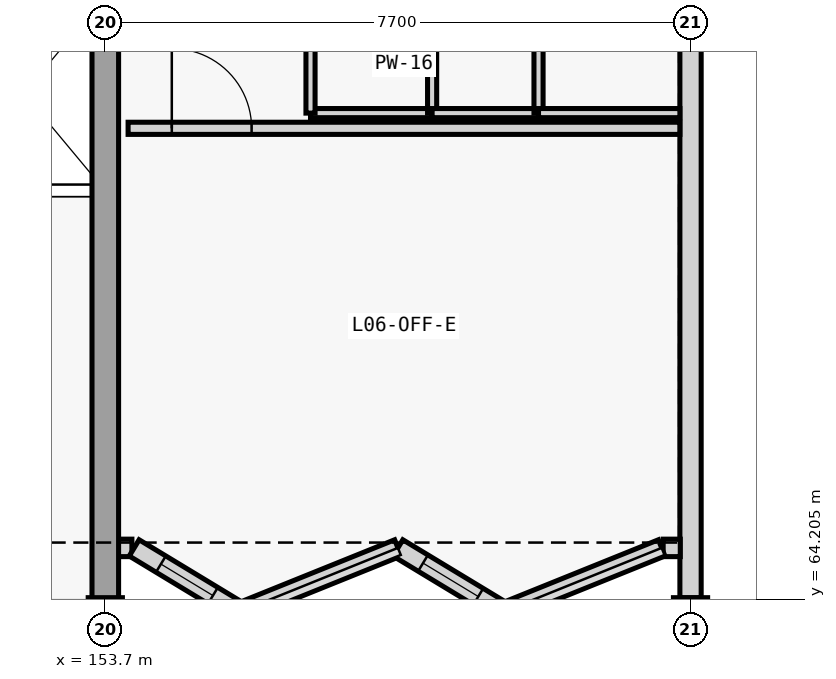
"""IFC4 building model, lengths in metres.
Left out: names, types, materials, properties, quantities, classifications, styles, units other than length and angle.
Written with IfcOpenShell. Run it as: python <this file> out.ifc"""

import sys

from ifc_helpers import new_model, si_unit, direction, frame, frame_2d, origin, origin_2d, place, context, subcontext, project, spatial, rectangle, extrude, element, fill, save


model = new_model("IFC4")
c1 = context("Model", 3, precision=1e-05, world=origin(), true_north=direction((0.0, 1.0)))
c2 = subcontext(c1, "Body", "Model", "MODEL_VIEW")
j1 = project(units=[si_unit("LENGTHUNIT", "METRE"), si_unit("PLANEANGLEUNIT", "RADIAN")], contexts=[c1])
p1 = place(None, origin())
s1 = spatial("IfcSite", under=j1, at=p1, CompositionType="ELEMENT")
p2 = place(p1, origin())
s2 = spatial("IfcBuilding", under=s1, at=p2, CompositionType="ELEMENT")
p3 = place(p2, frame((0.0, 0.0, 25.2)))
s3 = spatial("IfcBuildingStorey", under=s2, at=p3, CompositionType="ELEMENT", Elevation=25.2)
for number, where, z_axis, x_axis in (
    (1, (153.7, 64.0, 0.0), (0.0, 0.0, 1.0), (1.0, 0.0, 0.0)),
    (2, (161.4, 64.0, 0.0), (0.0, 0.0, 1.0), (1.0, 0.0, 0.0)),
):
    element("IfcColumn", number, at=place(p3, frame(where, z_axis=z_axis, x_axis=x_axis)), inside=s3, PredefinedType="COLUMN", context=c2, shape_type="SweptSolid", body=[
        extrude(rectangle(XDim=0.45, YDim=0.45, at=origin_2d()), origin(), (0.0, 0.0, 1.0), 3.6),
    ])
p4 = place(p3, frame((161.4, 96.777, 0.0), z_axis=(0.0, 0.0, 1.0), x_axis=(0.0, -1.0, 0.0)))
e3 = element("IfcWall", 3, at=p4, inside=s3, PredefinedType="SOLIDWALL", context=c2, shape_type="SweptSolid", body=[
    extrude(rectangle(XDim=32.554, YDim=0.28, at=frame_2d((16.277, 0.0))), origin(), (0.0, 0.0, 1.0), 2.78),
])
p5 = place(p4, frame((17.477, 0.0, 0.82)))
e4 = element("IfcOpeningElement", 4, at=p5, cuts=e3, PredefinedType="OPENING", context=c2, shape_type="SweptSolid", body=[
    extrude(rectangle(XDim=5.0, YDim=1.5, at=frame_2d((2.5, 0.75))), frame((0.0, 0.15, 0.0), z_axis=(0.0, -1.0, 0.0), x_axis=(1.0, 0.0, 0.0)), (0.0, 0.0, 1.0), 0.3),
])
p6 = place(p3, frame((154.05, 64.88, 0.0), z_axis=(0.0, 0.0, 1.0), x_axis=(-1.0, 0.0, 0.0)))
e5 = element("IfcWall", 5, at=p6, inside=s3, PredefinedType="SOLIDWALL", context=c2, shape_type="SweptSolid", body=[
    extrude(rectangle(XDim=0.18, YDim=0.23, at=frame_2d((0.09, 0.0))), origin(), (0.0, 0.0, 1.0), 3.36),
])
p7 = place(p3, frame((161.265, 64.88, 0.0), z_axis=(0.0, 0.0, 1.0), x_axis=(-1.0, 0.0, 0.0)))
e6 = element("IfcWall", 6, at=p7, inside=s3, PredefinedType="SOLIDWALL", context=c2, shape_type="SweptSolid", body=[
    extrude(rectangle(XDim=0.225, YDim=0.23, at=frame_2d((0.112, 0.0))), origin(), (0.0, 0.0, 1.0), 3.36),
])
p8 = place(p3, frame((155.468, 64.04, 0.0), z_axis=(0.0, 0.0, 1.0), x_axis=(-0.855561475997, 0.51770122734, 0.0)))
e7 = element("IfcWall", 7, at=p8, inside=s3, PredefinedType="SOLIDWALL", context=c2, shape_type="SweptSolid", body=[
    extrude(rectangle(XDim=1.622, YDim=0.25, at=frame_2d((0.811, 0.0))), origin(), (0.0, 0.0, 1.0), 3.36),
])
p9 = place(p8, frame((0.411, 0.0, 0.82)))
e8 = element("IfcOpeningElement", 8, at=p9, cuts=e7, PredefinedType="OPENING", context=c2, shape_type="SweptSolid", body=[
    extrude(rectangle(XDim=0.8, YDim=1.35, at=frame_2d((0.4, 0.675))), frame((0.0, 0.135, 0.0), z_axis=(0.0, -1.0, 0.0), x_axis=(1.0, 0.0, 0.0)), (0.0, 0.0, 1.0), 0.27),
])
p10 = place(p3, frame((157.55, 64.88, 0.0), z_axis=(0.0, 0.0, 1.0), x_axis=(-0.927392797001, -0.374089026933, 0.0)))
e9 = element("IfcWall", 9, at=p10, inside=s3, PredefinedType="SOLIDWALL", context=c2, shape_type="SweptSolid", body=[
    extrude(rectangle(XDim=2.245, YDim=0.23, at=frame_2d((1.123, 0.0))), origin(), (0.0, 0.0, 1.0), 3.36),
])
p11 = place(p3, frame((158.938, 64.04, 0.0), z_axis=(0.0, 0.0, 1.0), x_axis=(-0.855561475997, 0.51770122734, 0.0)))
e10 = element("IfcWall", 10, at=p11, inside=s3, PredefinedType="SOLIDWALL", context=c2, shape_type="SweptSolid", body=[
    extrude(rectangle(XDim=1.622, YDim=0.25, at=frame_2d((0.811, 0.0))), origin(), (0.0, 0.0, 1.0), 3.36),
])
p12 = place(p11, frame((0.386, 0.0, 0.82)))
e11 = element("IfcOpeningElement", 11, at=p12, cuts=e10, PredefinedType="OPENING", context=c2, shape_type="SweptSolid", body=[
    extrude(rectangle(XDim=0.85, YDim=1.4, at=frame_2d((0.425, 0.7))), frame((0.0, 0.135, 0.0), z_axis=(0.0, -1.0, 0.0), x_axis=(1.0, 0.0, 0.0)), (0.0, 0.0, 1.0), 0.27),
])
p13 = place(p3, frame((161.02, 64.88, 0.0), z_axis=(0.0, 0.0, 1.0), x_axis=(-0.927392797001, -0.374089026933, 0.0)))
e12 = element("IfcWall", 12, at=p13, inside=s3, PredefinedType="SOLIDWALL", context=c2, shape_type="SweptSolid", body=[
    extrude(rectangle(XDim=2.245, YDim=0.23, at=frame_2d((1.123, 0.0))), origin(), (0.0, 0.0, 1.0), 3.36),
])
p14 = place(p3, frame((153.7, 64.0, 0.0), z_axis=(0.0, 0.0, 1.0), x_axis=(0.0, 1.0, 0.0)))
e13 = element("IfcWall", 13, at=p14, inside=s3, PredefinedType="SHEAR", context=c2, shape_type="SweptSolid", body=[
    extrude(rectangle(XDim=8.4, YDim=0.35, at=frame_2d((4.2, 0.0))), origin(), (0.0, 0.0, 1.0), 3.6),
])
p15 = place(p3, frame((156.4, 70.6, 0.0), z_axis=(0.0, 0.0, 1.0), x_axis=(1.0, 0.0, 0.0)))
e14 = element("IfcWall", 14, at=p15, inside=s3, PredefinedType="PARTITIONING", context=c2, shape_type="SweptSolid", body=[
    extrude(rectangle(XDim=1.6, YDim=0.12, at=frame_2d((0.8, 0.0))), origin(), (0.0, 0.0, 1.0), 3.34),
])
p16 = place(p3, frame((156.4, 70.6, 0.0), z_axis=(0.0, 0.0, 1.0), x_axis=(0.0, 1.0, 0.0)))
e15 = element("IfcWall", 15, at=p16, inside=s3, PredefinedType="PARTITIONING", context=c2, shape_type="SweptSolid", body=[
    extrude(rectangle(XDim=5.2, YDim=0.12, at=frame_2d((2.6, 0.0))), origin(), (0.0, 0.0, 1.0), 3.34),
])
p17 = place(p16, frame((2.16, 0.0, 0.0)))
e16 = element("IfcOpeningElement", 16, at=p17, cuts=e15, PredefinedType="OPENING", context=c2, shape_type="SweptSolid", body=[
    extrude(rectangle(XDim=0.88, YDim=2.1, at=frame_2d((0.44, 1.05))), frame((0.0, 0.07, 0.0), z_axis=(0.0, -1.0, 0.0), x_axis=(1.0, 0.0, 0.0)), (0.0, 0.0, 1.0), 0.14),
])
p18 = place(p3, frame((158.0, 70.6, 0.0), z_axis=(0.0, 0.0, 1.0), x_axis=(0.0, 1.0, 0.0)))
e17 = element("IfcWall", 17, at=p18, inside=s3, PredefinedType="PARTITIONING", context=c2, shape_type="SweptSolid", body=[
    extrude(rectangle(XDim=5.2, YDim=0.12, at=frame_2d((2.6, 0.0))), origin(), (0.0, 0.0, 1.0), 3.34),
])
p19 = place(p3, frame((158.0, 70.6, 0.0), z_axis=(0.0, 0.0, 1.0), x_axis=(1.0, 0.0, 0.0)))
e18 = element("IfcWall", 18, at=p19, inside=s3, PredefinedType="PARTITIONING", context=c2, shape_type="SweptSolid", body=[
    extrude(rectangle(XDim=1.4, YDim=0.12, at=frame_2d((0.7, 0.0))), origin(), (0.0, 0.0, 1.0), 3.34),
])
p20 = place(p3, frame((159.4, 70.6, 0.0), z_axis=(0.0, 0.0, 1.0), x_axis=(0.0, 1.0, 0.0)))
e19 = element("IfcWall", 19, at=p20, inside=s3, PredefinedType="PARTITIONING", context=c2, shape_type="SweptSolid", body=[
    extrude(rectangle(XDim=5.2, YDim=0.12, at=frame_2d((2.6, 0.0))), origin(), (0.0, 0.0, 1.0), 3.34),
])
p21 = place(p3, frame((159.4, 70.6, 0.0), z_axis=(0.0, 0.0, 1.0), x_axis=(1.0, 0.0, 0.0)))
e20 = element("IfcWall", 20, at=p21, inside=s3, PredefinedType="PARTITIONING", context=c2, shape_type="SweptSolid", body=[
    extrude(rectangle(XDim=1.86, YDim=0.12, at=frame_2d((0.93, 0.0))), origin(), (0.0, 0.0, 1.0), 3.34),
])
p22 = place(p3, frame((154.0, 70.4, 0.0), z_axis=(0.0, 0.0, 1.0), x_axis=(1.0, 0.0, 0.0)))
e21 = element("IfcWall", 21, at=p22, inside=s3, PredefinedType="PARTITIONING", context=c2, shape_type="SweptSolid", body=[
    extrude(rectangle(XDim=7.26, YDim=0.16, at=frame_2d((3.63, 0.0))), origin(), (0.0, 0.0, 1.0), 3.34),
])
p23 = place(p22, frame((0.575, 0.0, 0.0)))
e22 = element("IfcOpeningElement", 22, at=p23, cuts=e21, PredefinedType="OPENING", context=c2, shape_type="SweptSolid", body=[
    extrude(rectangle(XDim=1.05, YDim=2.15, at=frame_2d((0.525, 1.075))), frame((0.0, 0.09, 0.0), z_axis=(0.0, -1.0, 0.0), x_axis=(1.0, 0.0, 0.0)), (0.0, 0.0, 1.0), 0.18),
])
p24 = place(p9, origin())
e23 = element("IfcWindow", 23, at=p24, inside=s3, PartitioningType="SINGLE_PANEL", PredefinedType="WINDOW", context=c2, shape_type="SweptSolid", body=[
    extrude(rectangle(XDim=0.8, YDim=1.35, at=frame_2d((0.4, 0.675))), frame((0.0, 0.03, 0.0), z_axis=(0.0, -1.0, 0.0), x_axis=(1.0, 0.0, 0.0)), (0.0, 0.0, 1.0), 0.06),
])
fill(e8, e23)
p25 = place(p12, origin())
e24 = element("IfcWindow", 24, at=p25, inside=s3, PartitioningType="SINGLE_PANEL", PredefinedType="WINDOW", context=c2, shape_type="SweptSolid", body=[
    extrude(rectangle(XDim=0.85, YDim=1.4, at=frame_2d((0.425, 0.7))), frame((0.0, 0.03, 0.0), z_axis=(0.0, -1.0, 0.0), x_axis=(1.0, 0.0, 0.0)), (0.0, 0.0, 1.0), 0.06),
])
fill(e11, e24)
p26 = place(p23, origin())
e25 = element("IfcDoor", 25, at=p26, inside=s3, OperationType="SINGLE_SWING_LEFT", PredefinedType="DOOR", context=c2, shape_type="SweptSolid", body=[
    extrude(rectangle(XDim=1.05, YDim=2.15, at=frame_2d((0.525, 1.075))), frame((0.0, 0.025, 0.0), z_axis=(0.0, -1.0, 0.0), x_axis=(1.0, 0.0, 0.0)), (0.0, 0.0, 1.0), 0.05),
])
fill(e22, e25)
save(model, sys.argv[1])
